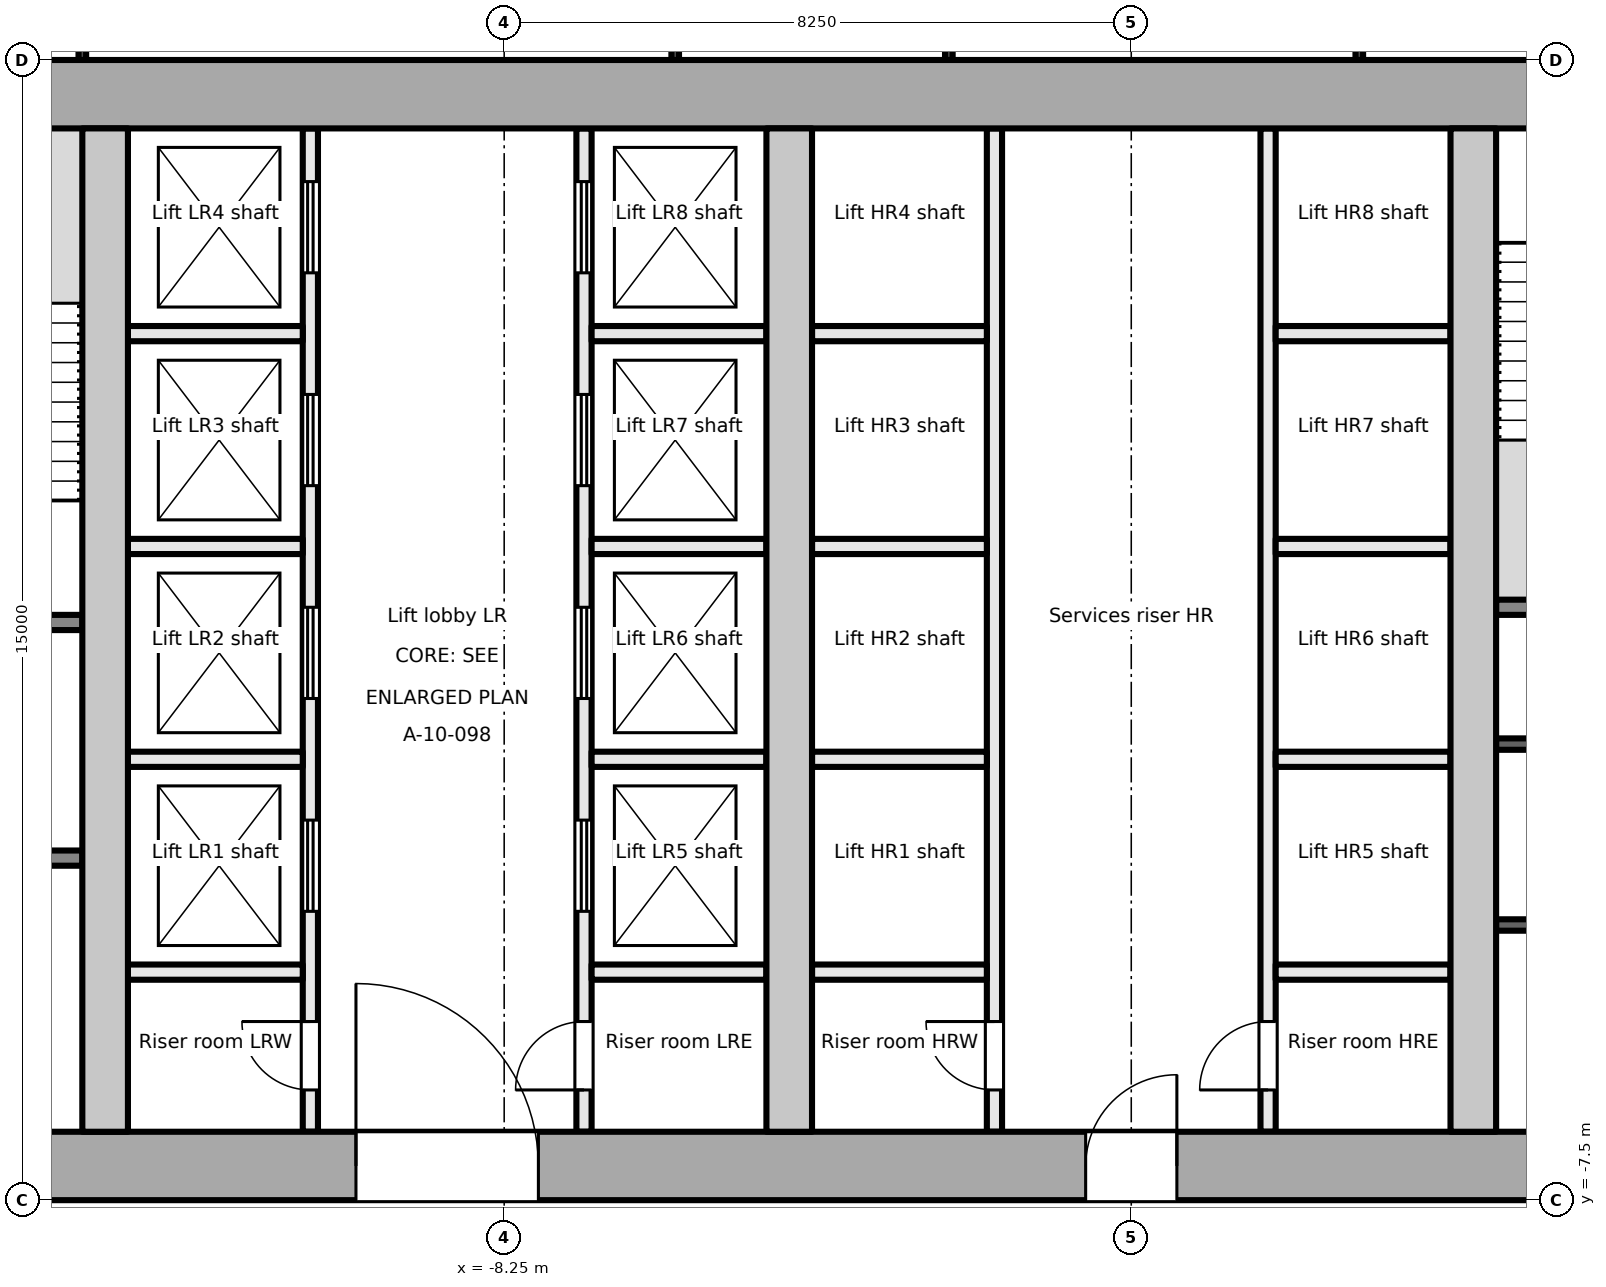
"""IFC4 building model, lengths in metres.
Left out: names, types, materials, properties, quantities, classifications, styles, units other than length and angle.
Written with IfcOpenShell. Run it as: python <this file> out.ifc"""

import sys

from ifc_helpers import new_model, si_unit, direction, frame, frame_2d, origin, place, context, subcontext, project, spatial, rectangle, extrude, element, fill, save


model = new_model("IFC4")
c1 = context("Model", 3, precision=1e-05, world=origin(), true_north=direction((0.0, 1.0)))
c2 = subcontext(c1, "Body", "Model", "MODEL_VIEW")
j1 = project(units=[si_unit("LENGTHUNIT", "METRE"), si_unit("PLANEANGLEUNIT", "RADIAN")], contexts=[c1])
p1 = place(None, origin())
s1 = spatial("IfcSite", under=j1, at=p1, CompositionType="ELEMENT")
p2 = place(p1, origin())
s2 = spatial("IfcBuilding", under=s1, at=p2, CompositionType="ELEMENT")
p3 = place(p2, frame((0.0, 0.0, 138.1)))
s3 = spatial("IfcBuildingStorey", under=s2, at=p3, CompositionType="ELEMENT", Elevation=138.1)
p4 = place(p3, frame((-18.0, -7.05, -0.2), z_axis=(0.0, 0.0, 1.0), x_axis=(1.0, 0.0, 0.0)))
e1 = element("IfcWall", 1, at=p4, inside=s3, PredefinedType="SHEAR", context=c2, shape_type="SweptSolid", body=[
    extrude(rectangle(XDim=36.0, YDim=0.9, at=frame_2d((18.0, 0.0))), origin(), (0.0, 0.0, 1.0), 4.0),
])
p5 = place(p4, frame((7.8, 0.0, 0.2)))
e2 = element("IfcOpeningElement", 2, at=p5, cuts=e1, PredefinedType="OPENING", context=c2, shape_type="SweptSolid", body=[
    extrude(rectangle(XDim=2.4, YDim=2.1, at=frame_2d((1.2, 1.05))), frame((0.0, 0.46, 0.0), z_axis=(0.0, -1.0, 0.0), x_axis=(1.0, 0.0, 0.0)), (0.0, 0.0, 1.0), 0.921),
])
p6 = place(p4, frame((17.4, 0.0, 0.2)))
e3 = element("IfcOpeningElement", 3, at=p6, cuts=e1, PredefinedType="OPENING", context=c2, shape_type="SweptSolid", body=[
    extrude(rectangle(XDim=1.2, YDim=2.1, at=frame_2d((0.6, 1.05))), frame((0.0, 0.46, 0.0), z_axis=(0.0, -1.0, 0.0), x_axis=(1.0, 0.0, 0.0)), (0.0, 0.0, 1.0), 0.921),
])
p7 = place(p4, frame((26.1, 0.0, 0.2)))
e4 = element("IfcOpeningElement", 4, at=p7, cuts=e1, PredefinedType="OPENING", context=c2, shape_type="SweptSolid", body=[
    extrude(rectangle(XDim=2.4, YDim=2.1, at=frame_2d((1.2, 1.05))), frame((0.0, 0.46, 0.0), z_axis=(0.0, -1.0, 0.0), x_axis=(1.0, 0.0, 0.0)), (0.0, 0.0, 1.0), 0.921),
])
p8 = place(p3, frame((-18.0, 7.05, -0.2), z_axis=(0.0, 0.0, 1.0), x_axis=(1.0, 0.0, 0.0)))
e5 = element("IfcWall", 5, at=p8, inside=s3, PredefinedType="SHEAR", context=c2, shape_type="SweptSolid", body=[
    extrude(rectangle(XDim=36.0, YDim=0.9, at=frame_2d((18.0, 0.0))), origin(), (0.0, 0.0, 1.0), 4.0),
])
for number, where, z_axis, x_axis in (
    (6, (-13.5, -6.6, -0.2), (0.0, 0.0, 1.0), (0.0, 1.0, 0.0)),
    (7, (-4.5, -6.6, -0.2), (0.0, 0.0, 1.0), (0.0, 1.0, 0.0)),
    (8, (4.5, -6.6, -0.2), (0.0, 0.0, 1.0), (0.0, 1.0, 0.0)),
):
    element("IfcWall", number, at=place(p3, frame(where, z_axis=z_axis, x_axis=x_axis)), inside=s3, PredefinedType="SHEAR", context=c2, shape_type="SweptSolid", body=[
        extrude(rectangle(XDim=13.2, YDim=0.6, at=frame_2d((6.6, 0.0))), origin(), (0.0, 0.0, 1.0), 4.0),
    ])
p9 = place(p3, frame((-17.1, -3.0, 0.0), z_axis=(0.0, 0.0, 1.0), x_axis=(1.0, 0.0, 0.0)))
e9 = element("IfcWall", 9, at=p9, inside=s3, PredefinedType="PARTITIONING", context=c2, shape_type="SweptSolid", body=[
    extrude(rectangle(XDim=3.3, YDim=0.2, at=frame_2d((1.65, 0.0))), origin(), (0.0, 0.0, 1.0), 3.8),
])
p10 = place(p9, frame((1.1, 0.0, 0.0)))
e10 = element("IfcOpeningElement", 10, at=p10, cuts=e9, PredefinedType="OPENING", context=c2, shape_type="SweptSolid", body=[
    extrude(rectangle(XDim=1.1, YDim=2.1, at=frame_2d((0.55, 1.05))), frame((0.0, 0.111, 0.0), z_axis=(0.0, -1.0, 0.0), x_axis=(1.0, 0.0, 0.0)), (0.0, 0.0, 1.0), 0.221),
])
p11 = place(p3, frame((-17.1, 0.1, 0.0), z_axis=(0.0, 0.0, 1.0), x_axis=(1.0, 0.0, 0.0)))
e11 = element("IfcWall", 11, at=p11, inside=s3, PredefinedType="PARTITIONING", context=c2, shape_type="SweptSolid", body=[
    extrude(rectangle(XDim=3.3, YDim=0.2, at=frame_2d((1.65, 0.0))), origin(), (0.0, 0.0, 1.0), 3.8),
])
p12 = place(p11, frame((1.1, 0.0, 0.0)))
e12 = element("IfcOpeningElement", 12, at=p12, cuts=e11, PredefinedType="OPENING", context=c2, shape_type="SweptSolid", body=[
    extrude(rectangle(XDim=1.1, YDim=2.1, at=frame_2d((0.55, 1.05))), frame((0.0, 0.111, 0.0), z_axis=(0.0, -1.0, 0.0), x_axis=(1.0, 0.0, 0.0)), (0.0, 0.0, 1.0), 0.221),
])
p13 = place(p3, frame((-10.8, -6.6, 0.0), z_axis=(0.0, 0.0, 1.0), x_axis=(0.0, 1.0, 0.0)))
e13 = element("IfcWall", 13, at=p13, inside=s3, PredefinedType="PARTITIONING", context=c2, shape_type="SweptSolid", body=[
    extrude(rectangle(XDim=13.2, YDim=0.2, at=frame_2d((6.6, 0.0))), origin(), (0.0, 0.0, 1.0), 3.8),
])
p14 = place(p13, frame((0.55, 0.0, 0.0)))
e14 = element("IfcOpeningElement", 14, at=p14, cuts=e13, PredefinedType="OPENING", context=c2, shape_type="SweptSolid", body=[
    extrude(rectangle(XDim=0.9, YDim=2.1, at=frame_2d((0.45, 1.05))), frame((0.0, 0.111, 0.0), z_axis=(0.0, -1.0, 0.0), x_axis=(1.0, 0.0, 0.0)), (0.0, 0.0, 1.0), 0.221),
])
p15 = place(p13, frame((2.9, 0.0, 0.0)))
e15 = element("IfcOpeningElement", 15, at=p15, cuts=e13, PredefinedType="OPENING", context=c2, shape_type="SweptSolid", body=[
    extrude(rectangle(XDim=1.2, YDim=2.1, at=frame_2d((0.6, 1.05))), frame((0.0, 0.111, 0.0), z_axis=(0.0, -1.0, 0.0), x_axis=(1.0, 0.0, 0.0)), (0.0, 0.0, 1.0), 0.221),
])
p16 = place(p13, frame((5.7, 0.0, 0.0)))
e16 = element("IfcOpeningElement", 16, at=p16, cuts=e13, PredefinedType="OPENING", context=c2, shape_type="SweptSolid", body=[
    extrude(rectangle(XDim=1.2, YDim=2.1, at=frame_2d((0.6, 1.05))), frame((0.0, 0.111, 0.0), z_axis=(0.0, -1.0, 0.0), x_axis=(1.0, 0.0, 0.0)), (0.0, 0.0, 1.0), 0.221),
])
p17 = place(p13, frame((8.5, 0.0, 0.0)))
e17 = element("IfcOpeningElement", 17, at=p17, cuts=e13, PredefinedType="OPENING", context=c2, shape_type="SweptSolid", body=[
    extrude(rectangle(XDim=1.2, YDim=2.1, at=frame_2d((0.6, 1.05))), frame((0.0, 0.111, 0.0), z_axis=(0.0, -1.0, 0.0), x_axis=(1.0, 0.0, 0.0)), (0.0, 0.0, 1.0), 0.221),
])
p18 = place(p13, frame((11.3, 0.0, 0.0)))
e18 = element("IfcOpeningElement", 18, at=p18, cuts=e13, PredefinedType="OPENING", context=c2, shape_type="SweptSolid", body=[
    extrude(rectangle(XDim=1.2, YDim=2.1, at=frame_2d((0.6, 1.05))), frame((0.0, 0.111, 0.0), z_axis=(0.0, -1.0, 0.0), x_axis=(1.0, 0.0, 0.0)), (0.0, 0.0, 1.0), 0.221),
])
p19 = place(p3, frame((-7.2, -6.6, 0.0), z_axis=(0.0, 0.0, 1.0), x_axis=(0.0, 1.0, 0.0)))
e19 = element("IfcWall", 19, at=p19, inside=s3, PredefinedType="PARTITIONING", context=c2, shape_type="SweptSolid", body=[
    extrude(rectangle(XDim=13.2, YDim=0.2, at=frame_2d((6.6, 0.0))), origin(), (0.0, 0.0, 1.0), 3.8),
])
p20 = place(p19, frame((0.55, 0.0, 0.0)))
e20 = element("IfcOpeningElement", 20, at=p20, cuts=e19, PredefinedType="OPENING", context=c2, shape_type="SweptSolid", body=[
    extrude(rectangle(XDim=0.9, YDim=2.1, at=frame_2d((0.45, 1.05))), frame((0.0, 0.111, 0.0), z_axis=(0.0, -1.0, 0.0), x_axis=(1.0, 0.0, 0.0)), (0.0, 0.0, 1.0), 0.221),
])
p21 = place(p19, frame((2.9, 0.0, 0.0)))
e21 = element("IfcOpeningElement", 21, at=p21, cuts=e19, PredefinedType="OPENING", context=c2, shape_type="SweptSolid", body=[
    extrude(rectangle(XDim=1.2, YDim=2.1, at=frame_2d((0.6, 1.05))), frame((0.0, 0.111, 0.0), z_axis=(0.0, -1.0, 0.0), x_axis=(1.0, 0.0, 0.0)), (0.0, 0.0, 1.0), 0.221),
])
p22 = place(p19, frame((5.7, 0.0, 0.0)))
e22 = element("IfcOpeningElement", 22, at=p22, cuts=e19, PredefinedType="OPENING", context=c2, shape_type="SweptSolid", body=[
    extrude(rectangle(XDim=1.2, YDim=2.1, at=frame_2d((0.6, 1.05))), frame((0.0, 0.111, 0.0), z_axis=(0.0, -1.0, 0.0), x_axis=(1.0, 0.0, 0.0)), (0.0, 0.0, 1.0), 0.221),
])
p23 = place(p19, frame((8.5, 0.0, 0.0)))
e23 = element("IfcOpeningElement", 23, at=p23, cuts=e19, PredefinedType="OPENING", context=c2, shape_type="SweptSolid", body=[
    extrude(rectangle(XDim=1.2, YDim=2.1, at=frame_2d((0.6, 1.05))), frame((0.0, 0.111, 0.0), z_axis=(0.0, -1.0, 0.0), x_axis=(1.0, 0.0, 0.0)), (0.0, 0.0, 1.0), 0.221),
])
p24 = place(p19, frame((11.3, 0.0, 0.0)))
e24 = element("IfcOpeningElement", 24, at=p24, cuts=e19, PredefinedType="OPENING", context=c2, shape_type="SweptSolid", body=[
    extrude(rectangle(XDim=1.2, YDim=2.1, at=frame_2d((0.6, 1.05))), frame((0.0, 0.111, 0.0), z_axis=(0.0, -1.0, 0.0), x_axis=(1.0, 0.0, 0.0)), (0.0, 0.0, 1.0), 0.221),
])
for number, where, z_axis, x_axis in (
    (25, (-13.2, -1.7, 0.0), (0.0, 0.0, 1.0), (1.0, 0.0, 0.0)),
    (26, (-13.2, 1.1, 0.0), (0.0, 0.0, 1.0), (1.0, 0.0, 0.0)),
    (27, (-13.2, 3.9, 0.0), (0.0, 0.0, 1.0), (1.0, 0.0, 0.0)),
    (28, (-13.2, -4.5, 0.0), (0.0, 0.0, 1.0), (1.0, 0.0, 0.0)),
    (29, (-7.1, -1.7, 0.0), (0.0, 0.0, 1.0), (1.0, 0.0, 0.0)),
    (30, (-7.1, 1.1, 0.0), (0.0, 0.0, 1.0), (1.0, 0.0, 0.0)),
    (31, (-7.1, 3.9, 0.0), (0.0, 0.0, 1.0), (1.0, 0.0, 0.0)),
    (32, (-7.1, -4.5, 0.0), (0.0, 0.0, 1.0), (1.0, 0.0, 0.0)),
):
    element("IfcWall", number, at=place(p3, frame(where, z_axis=z_axis, x_axis=x_axis)), inside=s3, PredefinedType="PARTITIONING", context=c2, shape_type="SweptSolid", body=[
        extrude(rectangle(XDim=2.3, YDim=0.2, at=frame_2d((1.15, 0.0))), origin(), (0.0, 0.0, 1.0), 3.8),
    ])
p25 = place(p3, frame((-1.8, -6.6, 0.0), z_axis=(0.0, 0.0, 1.0), x_axis=(0.0, 1.0, 0.0)))
e33 = element("IfcWall", 33, at=p25, inside=s3, PredefinedType="PARTITIONING", context=c2, shape_type="SweptSolid", body=[
    extrude(rectangle(XDim=13.2, YDim=0.2, at=frame_2d((6.6, 0.0))), origin(), (0.0, 0.0, 1.0), 3.8),
])
p26 = place(p25, frame((0.55, 0.0, 0.0)))
e34 = element("IfcOpeningElement", 34, at=p26, cuts=e33, PredefinedType="OPENING", context=c2, shape_type="SweptSolid", body=[
    extrude(rectangle(XDim=0.9, YDim=2.1, at=frame_2d((0.45, 1.05))), frame((0.0, 0.111, 0.0), z_axis=(0.0, -1.0, 0.0), x_axis=(1.0, 0.0, 0.0)), (0.0, 0.0, 1.0), 0.221),
])
p27 = place(p3, frame((1.8, -6.6, 0.0), z_axis=(0.0, 0.0, 1.0), x_axis=(0.0, 1.0, 0.0)))
e35 = element("IfcWall", 35, at=p27, inside=s3, PredefinedType="PARTITIONING", context=c2, shape_type="SweptSolid", body=[
    extrude(rectangle(XDim=13.2, YDim=0.2, at=frame_2d((6.6, 0.0))), origin(), (0.0, 0.0, 1.0), 3.8),
])
p28 = place(p27, frame((0.55, 0.0, 0.0)))
e36 = element("IfcOpeningElement", 36, at=p28, cuts=e35, PredefinedType="OPENING", context=c2, shape_type="SweptSolid", body=[
    extrude(rectangle(XDim=0.9, YDim=2.1, at=frame_2d((0.45, 1.05))), frame((0.0, 0.111, 0.0), z_axis=(0.0, -1.0, 0.0), x_axis=(1.0, 0.0, 0.0)), (0.0, 0.0, 1.0), 0.221),
])
for number, where, z_axis, x_axis in (
    (37, (-4.2, -1.7, 0.0), (0.0, 0.0, 1.0), (1.0, 0.0, 0.0)),
    (38, (-4.2, 1.1, 0.0), (0.0, 0.0, 1.0), (1.0, 0.0, 0.0)),
    (39, (-4.2, 3.9, 0.0), (0.0, 0.0, 1.0), (1.0, 0.0, 0.0)),
    (40, (-4.2, -4.5, 0.0), (0.0, 0.0, 1.0), (1.0, 0.0, 0.0)),
    (41, (1.9, -1.7, 0.0), (0.0, 0.0, 1.0), (1.0, 0.0, 0.0)),
    (42, (1.9, 1.1, 0.0), (0.0, 0.0, 1.0), (1.0, 0.0, 0.0)),
    (43, (1.9, 3.9, 0.0), (0.0, 0.0, 1.0), (1.0, 0.0, 0.0)),
    (44, (1.9, -4.5, 0.0), (0.0, 0.0, 1.0), (1.0, 0.0, 0.0)),
):
    element("IfcWall", number, at=place(p3, frame(where, z_axis=z_axis, x_axis=x_axis)), inside=s3, PredefinedType="PARTITIONING", context=c2, shape_type="SweptSolid", body=[
        extrude(rectangle(XDim=2.3, YDim=0.2, at=frame_2d((1.15, 0.0))), origin(), (0.0, 0.0, 1.0), 3.8),
    ])
p29 = place(p3, frame((4.8, 0.3, 0.0), z_axis=(0.0, 0.0, 1.0), x_axis=(1.0, 0.0, 0.0)))
e45 = element("IfcWall", 45, at=p29, inside=s3, PredefinedType="PARTITIONING", context=c2, shape_type="SweptSolid", body=[
    extrude(rectangle(XDim=3.15, YDim=0.2, at=frame_2d((1.575, 0.0))), origin(), (0.0, 0.0, 1.0), 3.8),
])
for number, where, z_axis, x_axis in (
    (46, (4.8, -3.88, 0.0), (0.0, 0.0, 1.0), (1.0, 0.0, 0.0)),
    (47, (4.8, -1.5, 0.0), (0.0, 0.0, 1.0), (1.0, 0.0, 0.0)),
):
    element("IfcWall", number, at=place(p3, frame(where, z_axis=z_axis, x_axis=x_axis)), inside=s3, PredefinedType="PARTITIONING", context=c2, shape_type="SweptSolid", body=[
        extrude(rectangle(XDim=3.15, YDim=0.15, at=frame_2d((1.575, 0.0))), origin(), (0.0, 0.0, 1.0), 3.8),
    ])
p30 = place(p3, frame((3.0, 7.5, 0.0), z_axis=(0.0, 0.0, 1.0), x_axis=(0.0, 1.0, 0.0)))
e48 = element("IfcWall", 48, at=p30, inside=s3, PredefinedType="PARTITIONING", context=c2, shape_type="SweptSolid", body=[
    extrude(rectangle(XDim=2.95, YDim=0.1, at=frame_2d((1.475, 0.0))), origin(), (0.0, 0.0, 1.0), 3.8),
])
p31 = place(p30, frame((0.575, 0.0, 0.9)))
e49 = element("IfcOpeningElement", 49, at=p31, cuts=e48, PredefinedType="OPENING", context=c2, shape_type="SweptSolid", body=[
    extrude(rectangle(XDim=1.8, YDim=1.2, at=frame_2d((0.9, 0.6))), frame((0.0, 0.061, 0.0), z_axis=(0.0, -1.0, 0.0), x_axis=(1.0, 0.0, 0.0)), (0.0, 0.0, 1.0), 0.121),
])
for number, where, z_axis, x_axis in (
    (50, (-13.8, 10.45, 0.0), (0.0, 0.0, 1.0), (0.0, -1.0, 0.0)),
    (51, (-6.0, 10.45, 0.0), (0.0, 0.0, 1.0), (0.0, -1.0, 0.0)),
    (52, (-2.4, 10.45, 0.0), (0.0, 0.0, 1.0), (0.0, -1.0, 0.0)),
):
    element("IfcWall", number, at=place(p3, frame(where, z_axis=z_axis, x_axis=x_axis)), inside=s3, PredefinedType="PARTITIONING", context=c2, shape_type="SweptSolid", body=[
        extrude(rectangle(XDim=2.95, YDim=0.1, at=frame_2d((1.475, 0.0))), origin(), (0.0, 0.0, 1.0), 3.8),
    ])
p32 = place(p14, origin())
e53 = element("IfcDoor", 53, at=p32, inside=s3, OperationType="SINGLE_SWING_RIGHT", PredefinedType="DOOR", context=c2, shape_type="SweptSolid", body=[
    extrude(rectangle(XDim=0.9, YDim=2.1, at=frame_2d((0.45, 1.05))), frame((0.0, 0.025, 0.0), z_axis=(0.0, -1.0, 0.0), x_axis=(1.0, 0.0, 0.0)), (0.0, 0.0, 1.0), 0.05),
])
fill(e14, e53)
p33 = place(p15, origin())
e54 = element("IfcDoor", 54, at=p33, inside=s3, OperationType="DOUBLE_DOOR_SLIDING", PredefinedType="DOOR", context=c2, shape_type="SweptSolid", body=[
    extrude(rectangle(XDim=1.2, YDim=2.1, at=frame_2d((0.6, 1.05))), frame((0.0, 0.025, 0.0), z_axis=(0.0, -1.0, 0.0), x_axis=(1.0, 0.0, 0.0)), (0.0, 0.0, 1.0), 0.05),
])
fill(e15, e54)
p34 = place(p16, origin())
e55 = element("IfcDoor", 55, at=p34, inside=s3, OperationType="DOUBLE_DOOR_SLIDING", PredefinedType="DOOR", context=c2, shape_type="SweptSolid", body=[
    extrude(rectangle(XDim=1.2, YDim=2.1, at=frame_2d((0.6, 1.05))), frame((0.0, 0.025, 0.0), z_axis=(0.0, -1.0, 0.0), x_axis=(1.0, 0.0, 0.0)), (0.0, 0.0, 1.0), 0.05),
])
fill(e16, e55)
p35 = place(p17, origin())
e56 = element("IfcDoor", 56, at=p35, inside=s3, OperationType="DOUBLE_DOOR_SLIDING", PredefinedType="DOOR", context=c2, shape_type="SweptSolid", body=[
    extrude(rectangle(XDim=1.2, YDim=2.1, at=frame_2d((0.6, 1.05))), frame((0.0, 0.025, 0.0), z_axis=(0.0, -1.0, 0.0), x_axis=(1.0, 0.0, 0.0)), (0.0, 0.0, 1.0), 0.05),
])
fill(e17, e56)
p36 = place(p18, origin())
e57 = element("IfcDoor", 57, at=p36, inside=s3, OperationType="DOUBLE_DOOR_SLIDING", PredefinedType="DOOR", context=c2, shape_type="SweptSolid", body=[
    extrude(rectangle(XDim=1.2, YDim=2.1, at=frame_2d((0.6, 1.05))), frame((0.0, 0.025, 0.0), z_axis=(0.0, -1.0, 0.0), x_axis=(1.0, 0.0, 0.0)), (0.0, 0.0, 1.0), 0.05),
])
fill(e18, e57)
p37 = place(p20, origin())
e58 = element("IfcDoor", 58, at=p37, inside=s3, OperationType="SINGLE_SWING_LEFT", PredefinedType="DOOR", context=c2, shape_type="SweptSolid", body=[
    extrude(rectangle(XDim=0.9, YDim=2.1, at=frame_2d((0.45, 1.05))), frame((0.0, 0.025, 0.0), z_axis=(0.0, -1.0, 0.0), x_axis=(1.0, 0.0, 0.0)), (0.0, 0.0, 1.0), 0.05),
])
fill(e20, e58)
p38 = place(p21, origin())
e59 = element("IfcDoor", 59, at=p38, inside=s3, OperationType="DOUBLE_DOOR_SLIDING", PredefinedType="DOOR", context=c2, shape_type="SweptSolid", body=[
    extrude(rectangle(XDim=1.2, YDim=2.1, at=frame_2d((0.6, 1.05))), frame((0.0, 0.025, 0.0), z_axis=(0.0, -1.0, 0.0), x_axis=(1.0, 0.0, 0.0)), (0.0, 0.0, 1.0), 0.05),
])
fill(e21, e59)
p39 = place(p22, origin())
e60 = element("IfcDoor", 60, at=p39, inside=s3, OperationType="DOUBLE_DOOR_SLIDING", PredefinedType="DOOR", context=c2, shape_type="SweptSolid", body=[
    extrude(rectangle(XDim=1.2, YDim=2.1, at=frame_2d((0.6, 1.05))), frame((0.0, 0.025, 0.0), z_axis=(0.0, -1.0, 0.0), x_axis=(1.0, 0.0, 0.0)), (0.0, 0.0, 1.0), 0.05),
])
fill(e22, e60)
p40 = place(p23, origin())
e61 = element("IfcDoor", 61, at=p40, inside=s3, OperationType="DOUBLE_DOOR_SLIDING", PredefinedType="DOOR", context=c2, shape_type="SweptSolid", body=[
    extrude(rectangle(XDim=1.2, YDim=2.1, at=frame_2d((0.6, 1.05))), frame((0.0, 0.025, 0.0), z_axis=(0.0, -1.0, 0.0), x_axis=(1.0, 0.0, 0.0)), (0.0, 0.0, 1.0), 0.05),
])
fill(e23, e61)
p41 = place(p24, origin())
e62 = element("IfcDoor", 62, at=p41, inside=s3, OperationType="DOUBLE_DOOR_SLIDING", PredefinedType="DOOR", context=c2, shape_type="SweptSolid", body=[
    extrude(rectangle(XDim=1.2, YDim=2.1, at=frame_2d((0.6, 1.05))), frame((0.0, 0.025, 0.0), z_axis=(0.0, -1.0, 0.0), x_axis=(1.0, 0.0, 0.0)), (0.0, 0.0, 1.0), 0.05),
])
fill(e24, e62)
p42 = place(p5, origin())
e63 = element("IfcDoor", 63, at=p42, inside=s3, OperationType="DOUBLE_DOOR_DOUBLE_SWING", PredefinedType="DOOR", context=c2, shape_type="SweptSolid", body=[
    extrude(rectangle(XDim=2.4, YDim=2.1, at=frame_2d((1.2, 1.05))), frame((0.0, 0.025, 0.0), z_axis=(0.0, -1.0, 0.0), x_axis=(1.0, 0.0, 0.0)), (0.0, 0.0, 1.0), 0.05),
])
fill(e2, e63)
p43 = place(p26, origin())
e64 = element("IfcDoor", 64, at=p43, inside=s3, OperationType="SINGLE_SWING_RIGHT", PredefinedType="DOOR", context=c2, shape_type="SweptSolid", body=[
    extrude(rectangle(XDim=0.9, YDim=2.1, at=frame_2d((0.45, 1.05))), frame((0.0, 0.025, 0.0), z_axis=(0.0, -1.0, 0.0), x_axis=(1.0, 0.0, 0.0)), (0.0, 0.0, 1.0), 0.05),
])
fill(e34, e64)
p44 = place(p28, origin())
e65 = element("IfcDoor", 65, at=p44, inside=s3, OperationType="SINGLE_SWING_LEFT", PredefinedType="DOOR", context=c2, shape_type="SweptSolid", body=[
    extrude(rectangle(XDim=0.9, YDim=2.1, at=frame_2d((0.45, 1.05))), frame((0.0, 0.025, 0.0), z_axis=(0.0, -1.0, 0.0), x_axis=(1.0, 0.0, 0.0)), (0.0, 0.0, 1.0), 0.05),
])
fill(e36, e65)
p45 = place(p6, origin())
e66 = element("IfcDoor", 66, at=p45, inside=s3, OperationType="SINGLE_SWING_RIGHT", PredefinedType="DOOR", context=c2, shape_type="SweptSolid", body=[
    extrude(rectangle(XDim=1.2, YDim=2.1, at=frame_2d((0.6, 1.05))), frame((0.0, 0.025, 0.0), z_axis=(0.0, -1.0, 0.0), x_axis=(1.0, 0.0, 0.0)), (0.0, 0.0, 1.0), 0.05),
])
fill(e3, e66)
save(model, sys.argv[1])
